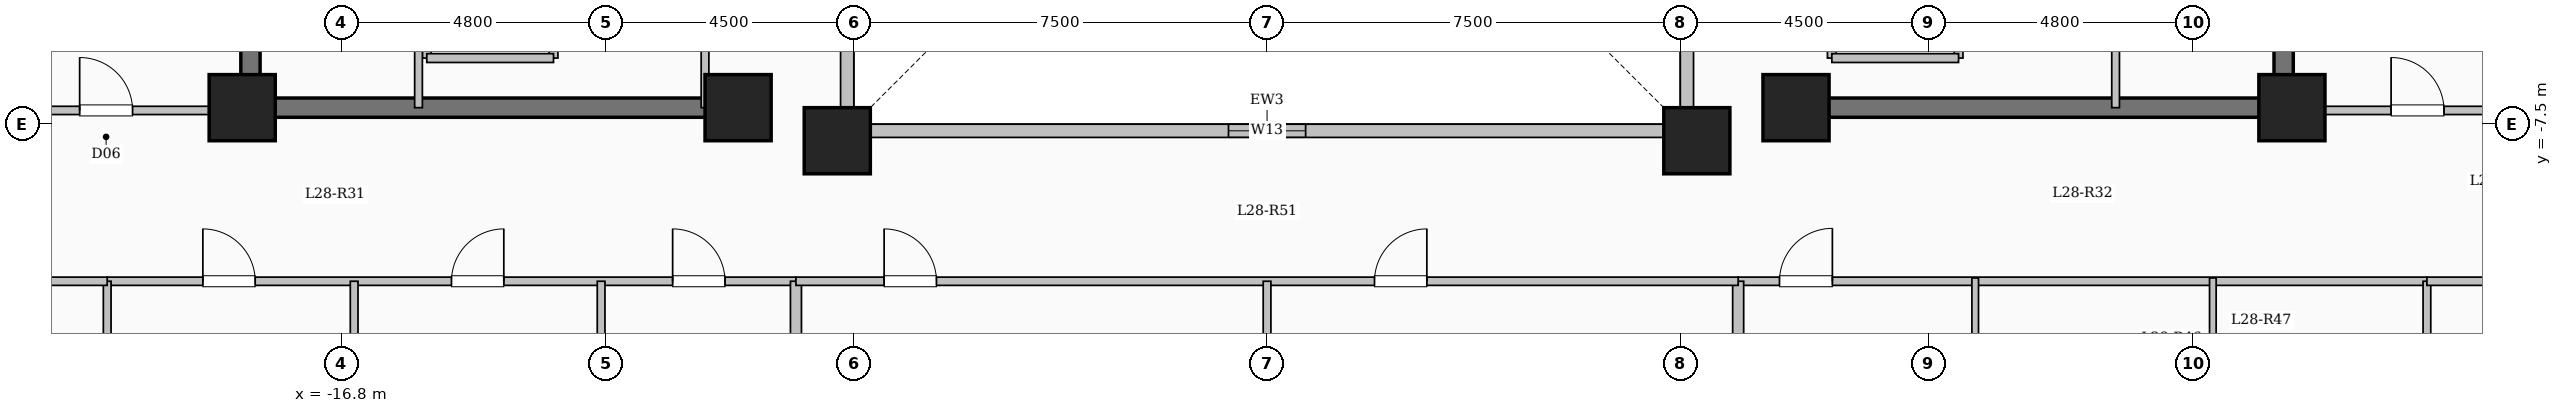
"""IFC4 building model, lengths in metres.
Left out: names, types, materials, properties, quantities, classifications, styles, units other than length and angle.
Written with IfcOpenShell. Run it as: python <this file> out.ifc"""

import sys

from ifc_helpers import new_model, si_unit, direction, frame, frame_2d, origin, origin_2d, place, context, subcontext, project, spatial, rectangle, extrude, element, fill, save


model = new_model("IFC4")
c1 = context("Model", 3, precision=1e-05, world=origin(), true_north=direction((0.0, 1.0)))
c2 = subcontext(c1, "Body", "Model", "MODEL_VIEW")
j1 = project(units=[si_unit("LENGTHUNIT", "METRE"), si_unit("PLANEANGLEUNIT", "RADIAN")], contexts=[c1])
p1 = place(None, origin())
s1 = spatial("IfcSite", under=j1, at=p1, CompositionType="ELEMENT")
p2 = place(p1, origin())
s2 = spatial("IfcBuilding", under=s1, at=p2, CompositionType="ELEMENT")
p3 = place(p2, frame((0.0, 0.0, 105.1)))
s3 = spatial("IfcBuildingStorey", under=s2, at=p3, CompositionType="ELEMENT", Elevation=105.1)
for number, where, z_axis, x_axis in (
    (1, (-7.8, -7.8, 0.0), (0.0, 0.0, 1.0), (1.0, 0.0, 0.0)),
    (2, (7.8, -7.8, 0.0), (0.0, 0.0, 1.0), (1.0, 0.0, 0.0)),
    (3, (-9.6, -7.2, 0.0), (0.0, 0.0, 1.0), (1.0, 0.0, 0.0)),
    (4, (9.6, -7.2, 0.0), (0.0, 0.0, 1.0), (1.0, 0.0, 0.0)),
    (5, (-18.6, -7.2, 0.0), (0.0, 0.0, 1.0), (1.0, 0.0, 0.0)),
    (6, (18.6, -7.2, 0.0), (0.0, 0.0, 1.0), (1.0, 0.0, 0.0)),
):
    element("IfcColumn", number, at=place(p3, frame(where, z_axis=z_axis, x_axis=x_axis)), inside=s3, PredefinedType="COLUMN", context=c2, shape_type="SweptSolid", body=[
        extrude(rectangle(XDim=1.2, YDim=1.2, at=origin_2d()), origin(), (0.0, 0.0, 1.0), 3.35),
    ])
p4 = place(p3, frame((-7.62, -7.62, 0.0), z_axis=(0.0, 0.0, 1.0), x_axis=(1.0, 0.0, 0.0)))
e7 = element("IfcWall", 7, at=p4, inside=s3, PredefinedType="SOLIDWALL", context=c2, shape_type="SweptSolid", body=[
    extrude(rectangle(XDim=15.24, YDim=0.24, at=frame_2d((7.62, 0.0))), origin(), (0.0, 0.0, 1.0), 3.1),
])
p5 = place(p4, frame((6.92, 0.0, 0.95)))
e8 = element("IfcOpeningElement", 8, at=p5, cuts=e7, PredefinedType="OPENING", context=c2, shape_type="SweptSolid", body=[
    extrude(rectangle(XDim=1.4, YDim=1.5, at=frame_2d((0.7, 0.75))), frame((0.0, 0.13, 0.0), z_axis=(0.0, -1.0, 0.0), x_axis=(1.0, 0.0, 0.0)), (0.0, 0.0, 1.0), 0.26),
])
p6 = place(p3, frame((7.62, -7.62, 0.0), z_axis=(0.0, 0.0, 1.0), x_axis=(0.0, 1.0, 0.0)))
e9 = element("IfcWall", 9, at=p6, inside=s3, PredefinedType="SOLIDWALL", context=c2, shape_type="SweptSolid", body=[
    extrude(rectangle(XDim=15.24, YDim=0.24, at=frame_2d((7.62, 0.0))), origin(), (0.0, 0.0, 1.0), 3.1),
])
p7 = place(p6, frame((6.92, 0.0, 0.95)))
e10 = element("IfcOpeningElement", 10, at=p7, cuts=e9, PredefinedType="OPENING", context=c2, shape_type="SweptSolid", body=[
    extrude(rectangle(XDim=1.4, YDim=1.5, at=frame_2d((0.7, 0.75))), frame((0.0, 0.13, 0.0), z_axis=(0.0, -1.0, 0.0), x_axis=(1.0, 0.0, 0.0)), (0.0, 0.0, 1.0), 0.26),
])
p8 = place(p3, frame((-7.62, 7.62, 0.0), z_axis=(0.0, 0.0, 1.0), x_axis=(0.0, -1.0, 0.0)))
e11 = element("IfcWall", 11, at=p8, inside=s3, PredefinedType="SOLIDWALL", context=c2, shape_type="SweptSolid", body=[
    extrude(rectangle(XDim=15.24, YDim=0.24, at=frame_2d((7.62, 0.0))), origin(), (0.0, 0.0, 1.0), 3.1),
])
p9 = place(p8, frame((6.92, 0.0, 0.95)))
e12 = element("IfcOpeningElement", 12, at=p9, cuts=e11, PredefinedType="OPENING", context=c2, shape_type="SweptSolid", body=[
    extrude(rectangle(XDim=1.4, YDim=1.5, at=frame_2d((0.7, 0.75))), frame((0.0, 0.13, 0.0), z_axis=(0.0, -1.0, 0.0), x_axis=(1.0, 0.0, 0.0)), (0.0, 0.0, 1.0), 0.26),
])
for number, where, z_axis, x_axis in (
    (13, (-15.25, -6.3, 0.0), (0.0, 0.0, 1.0), (0.0, 1.0, 0.0)),
    (14, (-12.95, -6.3, 0.0), (0.0, 0.0, 1.0), (0.0, 1.0, 0.0)),
):
    element("IfcWall", number, at=place(p3, frame(where, z_axis=z_axis, x_axis=x_axis)), inside=s3, PredefinedType="SOLIDWALL", context=c2, shape_type="SweptSolid", body=[
        extrude(rectangle(XDim=2.6, YDim=0.16, at=frame_2d((1.3, 0.0))), origin(), (0.0, 0.0, 1.0), 3.1),
    ])
p10 = place(p3, frame((-15.25, -6.3, 0.0), z_axis=(0.0, 0.0, 1.0), x_axis=(1.0, 0.0, 0.0)))
e15 = element("IfcWall", 15, at=p10, inside=s3, PredefinedType="SOLIDWALL", context=c2, shape_type="SweptSolid", body=[
    extrude(rectangle(XDim=2.3, YDim=0.16, at=frame_2d((1.15, 0.0))), origin(), (0.0, 0.0, 1.0), 3.1),
])
p11 = place(p3, frame((10.25, -6.3, 0.0), z_axis=(0.0, 0.0, 1.0), x_axis=(0.0, 1.0, 0.0)))
e16 = element("IfcWall", 16, at=p11, inside=s3, PredefinedType="SOLIDWALL", context=c2, shape_type="SweptSolid", body=[
    extrude(rectangle(XDim=2.6, YDim=0.16, at=frame_2d((1.3, 0.0))), origin(), (0.0, 0.0, 1.0), 3.1),
])
p12 = place(p11, frame((0.75, 0.0, 0.0)))
e17 = element("IfcOpeningElement", 17, at=p12, cuts=e16, PredefinedType="OPENING", context=c2, shape_type="SweptSolid", body=[
    extrude(rectangle(XDim=1.1, YDim=2.15, at=frame_2d((0.55, 1.075))), frame((0.0, 0.09, 0.0), z_axis=(0.0, -1.0, 0.0), x_axis=(1.0, 0.0, 0.0)), (0.0, 0.0, 1.0), 0.18),
])
p13 = place(p3, frame((12.55, -6.3, 0.0), z_axis=(0.0, 0.0, 1.0), x_axis=(0.0, 1.0, 0.0)))
e18 = element("IfcWall", 18, at=p13, inside=s3, PredefinedType="SOLIDWALL", context=c2, shape_type="SweptSolid", body=[
    extrude(rectangle(XDim=2.6, YDim=0.16, at=frame_2d((1.3, 0.0))), origin(), (0.0, 0.0, 1.0), 3.1),
])
p14 = place(p3, frame((10.25, -6.3, 0.0), z_axis=(0.0, 0.0, 1.0), x_axis=(1.0, 0.0, 0.0)))
e19 = element("IfcWall", 19, at=p14, inside=s3, PredefinedType="SOLIDWALL", context=c2, shape_type="SweptSolid", body=[
    extrude(rectangle(XDim=2.3, YDim=0.16, at=frame_2d((1.15, 0.0))), origin(), (0.0, 0.0, 1.0), 3.1),
])
p15 = place(p3, frame((-18.45, -7.375, 0.0), z_axis=(0.0, 0.0, 1.0), x_axis=(0.0, 1.0, 0.0)))
e20 = element("IfcWall", 20, at=p15, inside=s3, PredefinedType="SHEAR", context=c2, shape_type="SweptSolid", body=[
    extrude(rectangle(XDim=14.05, YDim=0.35, at=frame_2d((7.025, 0.0))), origin(), (0.0, 0.0, 1.0), 3.35),
])
p16 = place(p3, frame((-18.625, -7.2, 0.0), z_axis=(0.0, 0.0, 1.0), x_axis=(1.0, 0.0, 0.0)))
e21 = element("IfcWall", 21, at=p16, inside=s3, PredefinedType="SHEAR", context=c2, shape_type="SweptSolid", body=[
    extrude(rectangle(XDim=8.55, YDim=0.35, at=frame_2d((4.275, 0.0))), origin(), (0.0, 0.0, 1.0), 3.35),
])
p17 = place(p3, frame((18.45, -7.375, 0.0), z_axis=(0.0, 0.0, 1.0), x_axis=(0.0, 1.0, 0.0)))
e22 = element("IfcWall", 22, at=p17, inside=s3, PredefinedType="SHEAR", context=c2, shape_type="SweptSolid", body=[
    extrude(rectangle(XDim=14.05, YDim=0.35, at=frame_2d((7.025, 0.0))), origin(), (0.0, 0.0, 1.0), 3.35),
])
p18 = place(p3, frame((10.075, -7.2, 0.0), z_axis=(0.0, 0.0, 1.0), x_axis=(1.0, 0.0, 0.0)))
e23 = element("IfcWall", 23, at=p18, inside=s3, PredefinedType="SHEAR", context=c2, shape_type="SweptSolid", body=[
    extrude(rectangle(XDim=8.55, YDim=0.35, at=frame_2d((4.275, 0.0))), origin(), (0.0, 0.0, 1.0), 3.35),
])
p19 = place(p3, frame((-15.4, -7.2, 0.0), z_axis=(0.0, 0.0, 1.0), x_axis=(0.0, 1.0, 0.0)))
e24 = element("IfcWall", 24, at=p19, inside=s3, PredefinedType="PARTITIONING", context=c2, shape_type="SweptSolid", body=[
    extrude(rectangle(XDim=10.45, YDim=0.14, at=frame_2d((5.225, 0.0))), origin(), (0.0, 0.0, 1.0), 3.1),
])
p20 = place(p19, frame((9.25, 0.0, 0.0)))
e25 = element("IfcOpeningElement", 25, at=p20, cuts=e24, PredefinedType="OPENING", context=c2, shape_type="SweptSolid", body=[
    extrude(rectangle(XDim=0.9, YDim=2.08, at=frame_2d((0.45, 1.04))), frame((0.0, 0.08, 0.0), z_axis=(0.0, -1.0, 0.0), x_axis=(1.0, 0.0, 0.0)), (0.0, 0.0, 1.0), 0.16),
])
p21 = place(p3, frame((-10.2, -7.2, 0.0), z_axis=(0.0, 0.0, 1.0), x_axis=(0.0, 1.0, 0.0)))
e26 = element("IfcWall", 26, at=p21, inside=s3, PredefinedType="PARTITIONING", context=c2, shape_type="SweptSolid", body=[
    extrude(rectangle(XDim=9.12, YDim=0.14, at=frame_2d((4.56, 0.0))), origin(), (0.0, 0.0, 1.0), 3.1),
])
p22 = place(p21, frame((1.9, 0.0, 0.0)))
e27 = element("IfcOpeningElement", 27, at=p22, cuts=e26, PredefinedType="OPENING", context=c2, shape_type="SweptSolid", body=[
    extrude(rectangle(XDim=0.95, YDim=2.12, at=frame_2d((0.475, 1.06))), frame((0.0, 0.08, 0.0), z_axis=(0.0, -1.0, 0.0), x_axis=(1.0, 0.0, 0.0)), (0.0, 0.0, 1.0), 0.16),
])
p23 = place(p21, frame((5.8, 0.0, 0.0)))
e28 = element("IfcOpeningElement", 28, at=p23, cuts=e26, PredefinedType="OPENING", context=c2, shape_type="SweptSolid", body=[
    extrude(rectangle(XDim=0.95, YDim=2.12, at=frame_2d((0.475, 1.06))), frame((0.0, 0.08, 0.0), z_axis=(0.0, -1.0, 0.0), x_axis=(1.0, 0.0, 0.0)), (0.0, 0.0, 1.0), 0.16),
])
p24 = place(p3, frame((15.4, -7.2, 0.0), z_axis=(0.0, 0.0, 1.0), x_axis=(0.0, 1.0, 0.0)))
e29 = element("IfcWall", 29, at=p24, inside=s3, PredefinedType="PARTITIONING", context=c2, shape_type="SweptSolid", body=[
    extrude(rectangle(XDim=10.45, YDim=0.14, at=frame_2d((5.225, 0.0))), origin(), (0.0, 0.0, 1.0), 3.1),
])
p25 = place(p24, frame((9.25, 0.0, 0.0)))
e30 = element("IfcOpeningElement", 30, at=p25, cuts=e29, PredefinedType="OPENING", context=c2, shape_type="SweptSolid", body=[
    extrude(rectangle(XDim=0.9, YDim=2.08, at=frame_2d((0.45, 1.04))), frame((0.0, 0.08, 0.0), z_axis=(0.0, -1.0, 0.0), x_axis=(1.0, 0.0, 0.0)), (0.0, 0.0, 1.0), 0.16),
])
p26 = place(p3, frame((-21.05, -10.35, 0.0), z_axis=(0.0, 0.0, 1.0), x_axis=(1.0, 0.0, 0.0)))
e31 = element("IfcWall", 31, at=p26, inside=s3, PredefinedType="PARTITIONING", context=c2, shape_type="SweptSolid", body=[
    extrude(rectangle(XDim=12.5, YDim=0.15, at=frame_2d((6.25, 0.0))), origin(), (0.0, 0.0, 1.0), 3.1),
])
p27 = place(p26, frame((1.736, 0.0, 0.0)))
e32 = element("IfcOpeningElement", 32, at=p27, cuts=e31, PredefinedType="OPENING", context=c2, shape_type="SweptSolid", body=[
    extrude(rectangle(XDim=0.95, YDim=2.15, at=frame_2d((0.475, 1.075))), frame((0.0, 0.085, 0.0), z_axis=(0.0, -1.0, 0.0), x_axis=(1.0, 0.0, 0.0)), (0.0, 0.0, 1.0), 0.17),
])
p28 = place(p26, frame((6.248, 0.0, 0.0)))
e33 = element("IfcOpeningElement", 33, at=p28, cuts=e31, PredefinedType="OPENING", context=c2, shape_type="SweptSolid", body=[
    extrude(rectangle(XDim=0.95, YDim=2.15, at=frame_2d((0.475, 1.075))), frame((0.0, 0.085, 0.0), z_axis=(0.0, -1.0, 0.0), x_axis=(1.0, 0.0, 0.0)), (0.0, 0.0, 1.0), 0.17),
])
p29 = place(p26, frame((10.262, 0.0, 0.0)))
e34 = element("IfcOpeningElement", 34, at=p29, cuts=e31, PredefinedType="OPENING", context=c2, shape_type="SweptSolid", body=[
    extrude(rectangle(XDim=0.95, YDim=2.15, at=frame_2d((0.475, 1.075))), frame((0.0, 0.085, 0.0), z_axis=(0.0, -1.0, 0.0), x_axis=(1.0, 0.0, 0.0)), (0.0, 0.0, 1.0), 0.17),
])
p30 = place(p3, frame((8.55, -10.35, 0.0), z_axis=(0.0, 0.0, 1.0), x_axis=(1.0, 0.0, 0.0)))
e35 = element("IfcWall", 35, at=p30, inside=s3, PredefinedType="PARTITIONING", context=c2, shape_type="SweptSolid", body=[
    extrude(rectangle(XDim=12.5, YDim=0.15, at=frame_2d((6.25, 0.0))), origin(), (0.0, 0.0, 1.0), 3.1),
])
p31 = place(p30, frame((0.75, 0.0, 0.0)))
e36 = element("IfcOpeningElement", 36, at=p31, cuts=e35, PredefinedType="OPENING", context=c2, shape_type="SweptSolid", body=[
    extrude(rectangle(XDim=0.96, YDim=2.15, at=frame_2d((0.48, 1.075))), frame((0.0, 0.085, 0.0), z_axis=(0.0, -1.0, 0.0), x_axis=(1.0, 0.0, 0.0)), (0.0, 0.0, 1.0), 0.17),
])
for number, where, z_axis, x_axis in (
    (37, (-16.568, -22.05, 0.0), (0.0, 0.0, 1.0), (0.0, 1.0, 0.0)),
    (38, (-12.086, -22.05, 0.0), (0.0, 0.0, 1.0), (0.0, 1.0, 0.0)),
):
    element("IfcWall", number, at=place(p3, frame(where, z_axis=z_axis, x_axis=x_axis)), inside=s3, PredefinedType="PARTITIONING", context=c2, shape_type="SweptSolid", body=[
        extrude(rectangle(XDim=11.7, YDim=0.14, at=frame_2d((5.85, 0.0))), origin(), (0.0, 0.0, 1.0), 3.1),
    ])
p32 = place(p3, frame((12.852, -22.1, 0.0), z_axis=(0.0, 0.0, 1.0), x_axis=(0.0, 1.0, 0.0)))
e39 = element("IfcWall", 39, at=p32, inside=s3, PredefinedType="PARTITIONING", context=c2, shape_type="SweptSolid", body=[
    extrude(rectangle(XDim=11.81, YDim=0.12, at=frame_2d((5.905, 0.0))), origin(), (0.0, 0.0, 1.0), 3.1),
])
p33 = place(p32, frame((7.815, 0.0, 0.0)))
e40 = element("IfcOpeningElement", 40, at=p33, cuts=e39, PredefinedType="OPENING", context=c2, shape_type="SweptSolid", body=[
    extrude(rectangle(XDim=1.08, YDim=2.15, at=frame_2d((0.54, 1.075))), frame((0.0, 0.07, 0.0), z_axis=(0.0, -1.0, 0.0), x_axis=(1.0, 0.0, 0.0)), (0.0, 0.0, 1.0), 0.14),
])
p34 = place(p3, frame((17.165, -12.92, 0.0), z_axis=(0.0, 0.0, 1.0), x_axis=(0.0, 1.0, 0.0)))
e41 = element("IfcWall", 41, at=p34, inside=s3, PredefinedType="PARTITIONING", context=c2, shape_type="SweptSolid", body=[
    extrude(rectangle(XDim=2.63, YDim=0.12, at=frame_2d((1.315, 0.0))), origin(), (0.0, 0.0, 1.0), 3.1),
])
for number, where, z_axis, x_axis in (
    (42, (-8.55, -22.704, 0.0), (0.0, 0.0, 1.0), (0.0, 1.0, 0.0)),
    (43, (8.55, -22.704, 0.0), (0.0, 0.0, 1.0), (0.0, 1.0, 0.0)),
):
    element("IfcWall", number, at=place(p3, frame(where, z_axis=z_axis, x_axis=x_axis)), inside=s3, PredefinedType="SOLIDWALL", context=c2, shape_type="SweptSolid", body=[
        extrude(rectangle(XDim=12.354, YDim=0.2, at=frame_2d((6.177, 0.0))), origin(), (0.0, 0.0, 1.0), 3.1),
    ])
p35 = place(p3, frame((-8.55, -10.35, 0.0), z_axis=(0.0, 0.0, 1.0), x_axis=(1.0, 0.0, 0.0)))
e44 = element("IfcWall", 44, at=p35, inside=s3, PredefinedType="PARTITIONING", context=c2, shape_type="SweptSolid", body=[
    extrude(rectangle(XDim=17.1, YDim=0.15, at=frame_2d((8.55, 0.0))), origin(), (0.0, 0.0, 1.0), 3.1),
])
p36 = place(p35, frame((1.6, 0.0, 0.0)))
e45 = element("IfcOpeningElement", 45, at=p36, cuts=e44, PredefinedType="OPENING", context=c2, shape_type="SweptSolid", body=[
    extrude(rectangle(XDim=0.95, YDim=2.15, at=frame_2d((0.475, 1.075))), frame((0.0, 0.085, 0.0), z_axis=(0.0, -1.0, 0.0), x_axis=(1.0, 0.0, 0.0)), (0.0, 0.0, 1.0), 0.17),
])
p37 = place(p35, frame((10.5, 0.0, 0.0)))
e46 = element("IfcOpeningElement", 46, at=p37, cuts=e44, PredefinedType="OPENING", context=c2, shape_type="SweptSolid", body=[
    extrude(rectangle(XDim=0.95, YDim=2.15, at=frame_2d((0.475, 1.075))), frame((0.0, 0.085, 0.0), z_axis=(0.0, -1.0, 0.0), x_axis=(1.0, 0.0, 0.0)), (0.0, 0.0, 1.0), 0.17),
])
p38 = place(p3, frame((0.0, -23.58, 0.0), z_axis=(0.0, 0.0, 1.0), x_axis=(0.0, 1.0, 0.0)))
e47 = element("IfcWall", 47, at=p38, inside=s3, PredefinedType="PARTITIONING", context=c2, shape_type="SweptSolid", body=[
    extrude(rectangle(XDim=13.23, YDim=0.14, at=frame_2d((6.615, 0.0))), origin(), (0.0, 0.0, 1.0), 3.1),
])
p39 = place(p3, frame((-26.88, -7.25, 0.0), z_axis=(0.0, 0.0, 1.0), x_axis=(1.0, 0.0, 0.0)))
e48 = element("IfcWall", 48, at=p39, inside=s3, PredefinedType="PARTITIONING", context=c2, shape_type="SweptSolid", body=[
    extrude(rectangle(XDim=8.43, YDim=0.15, at=frame_2d((4.215, 0.0))), origin(), (0.0, 0.0, 1.0), 3.1),
])
p40 = place(p39, frame((5.33, 0.0, 0.0)))
e49 = element("IfcOpeningElement", 49, at=p40, cuts=e48, PredefinedType="OPENING", context=c2, shape_type="SweptSolid", body=[
    extrude(rectangle(XDim=0.96, YDim=2.15, at=frame_2d((0.48, 1.075))), frame((0.0, 0.085, 0.0), z_axis=(0.0, -1.0, 0.0), x_axis=(1.0, 0.0, 0.0)), (0.0, 0.0, 1.0), 0.17),
])
p41 = place(p3, frame((18.45, -7.25, 0.0), z_axis=(0.0, 0.0, 1.0), x_axis=(1.0, 0.0, 0.0)))
e50 = element("IfcWall", 50, at=p41, inside=s3, PredefinedType="PARTITIONING", context=c2, shape_type="SweptSolid", body=[
    extrude(rectangle(XDim=8.43, YDim=0.15, at=frame_2d((4.215, 0.0))), origin(), (0.0, 0.0, 1.0), 3.1),
])
p42 = place(p41, frame((1.95, 0.0, 0.0)))
e51 = element("IfcOpeningElement", 51, at=p42, cuts=e50, PredefinedType="OPENING", context=c2, shape_type="SweptSolid", body=[
    extrude(rectangle(XDim=0.96, YDim=2.15, at=frame_2d((0.48, 1.075))), frame((0.0, 0.085, 0.0), z_axis=(0.0, -1.0, 0.0), x_axis=(1.0, 0.0, 0.0)), (0.0, 0.0, 1.0), 0.17),
])
for number, where, z_axis, x_axis in (
    (52, (-21.05, -17.85, 0.0), (0.0, 0.0, 1.0), (0.0, 1.0, 0.0)),
    (53, (21.05, -17.85, 0.0), (0.0, 0.0, 1.0), (0.0, 1.0, 0.0)),
):
    element("IfcWall", number, at=place(p3, frame(where, z_axis=z_axis, x_axis=x_axis)), inside=s3, PredefinedType="PARTITIONING", context=c2, shape_type="SweptSolid", body=[
        extrude(rectangle(XDim=7.5, YDim=0.14, at=frame_2d((3.75, 0.0))), origin(), (0.0, 0.0, 1.0), 3.1),
    ])
p43 = place(p3, frame((-26.88, -10.35, 0.0), z_axis=(0.0, 0.0, 1.0), x_axis=(1.0, 0.0, 0.0)))
e54 = element("IfcWall", 54, at=p43, inside=s3, PredefinedType="PARTITIONING", context=c2, shape_type="SweptSolid", body=[
    extrude(rectangle(XDim=5.83, YDim=0.15, at=frame_2d((2.915, 0.0))), origin(), (0.0, 0.0, 1.0), 3.1),
])
p44 = place(p43, frame((2.44, 0.0, 0.0)))
e55 = element("IfcOpeningElement", 55, at=p44, cuts=e54, PredefinedType="OPENING", context=c2, shape_type="SweptSolid", body=[
    extrude(rectangle(XDim=0.95, YDim=2.15, at=frame_2d((0.475, 1.075))), frame((0.0, 0.085, 0.0), z_axis=(0.0, -1.0, 0.0), x_axis=(1.0, 0.0, 0.0)), (0.0, 0.0, 1.0), 0.17),
])
p45 = place(p3, frame((21.05, -10.35, 0.0), z_axis=(0.0, 0.0, 1.0), x_axis=(1.0, 0.0, 0.0)))
e56 = element("IfcWall", 56, at=p45, inside=s3, PredefinedType="PARTITIONING", context=c2, shape_type="SweptSolid", body=[
    extrude(rectangle(XDim=5.83, YDim=0.15, at=frame_2d((2.915, 0.0))), origin(), (0.0, 0.0, 1.0), 3.1),
])
p46 = place(p45, frame((2.44, 0.0, 0.0)))
e57 = element("IfcOpeningElement", 57, at=p46, cuts=e56, PredefinedType="OPENING", context=c2, shape_type="SweptSolid", body=[
    extrude(rectangle(XDim=0.95, YDim=2.15, at=frame_2d((0.475, 1.075))), frame((0.0, 0.085, 0.0), z_axis=(0.0, -1.0, 0.0), x_axis=(1.0, 0.0, 0.0)), (0.0, 0.0, 1.0), 0.17),
])
p47 = place(p5, origin())
e58 = element("IfcWindow", 58, at=p47, inside=s3, PartitioningType="SINGLE_PANEL", PredefinedType="WINDOW", context=c2, shape_type="SweptSolid", body=[
    extrude(rectangle(XDim=1.4, YDim=1.5, at=frame_2d((0.7, 0.75))), frame((0.0, 0.03, 0.0), z_axis=(0.0, -1.0, 0.0), x_axis=(1.0, 0.0, 0.0)), (0.0, 0.0, 1.0), 0.06),
])
fill(e8, e58)
p48 = place(p27, origin())
e59 = element("IfcDoor", 59, at=p48, inside=s3, OperationType="SINGLE_SWING_LEFT", PredefinedType="DOOR", context=c2, shape_type="SweptSolid", body=[
    extrude(rectangle(XDim=0.95, YDim=2.15, at=frame_2d((0.475, 1.075))), frame((0.0, 0.025, 0.0), z_axis=(0.0, -1.0, 0.0), x_axis=(1.0, 0.0, 0.0)), (0.0, 0.0, 1.0), 0.05),
])
fill(e32, e59)
p49 = place(p28, origin())
e60 = element("IfcDoor", 60, at=p49, inside=s3, OperationType="SINGLE_SWING_RIGHT", PredefinedType="DOOR", context=c2, shape_type="SweptSolid", body=[
    extrude(rectangle(XDim=0.95, YDim=2.15, at=frame_2d((0.475, 1.075))), frame((0.0, 0.025, 0.0), z_axis=(0.0, -1.0, 0.0), x_axis=(1.0, 0.0, 0.0)), (0.0, 0.0, 1.0), 0.05),
])
fill(e33, e60)
p50 = place(p29, origin())
e61 = element("IfcDoor", 61, at=p50, inside=s3, OperationType="SINGLE_SWING_LEFT", PredefinedType="DOOR", context=c2, shape_type="SweptSolid", body=[
    extrude(rectangle(XDim=0.95, YDim=2.15, at=frame_2d((0.475, 1.075))), frame((0.0, 0.025, 0.0), z_axis=(0.0, -1.0, 0.0), x_axis=(1.0, 0.0, 0.0)), (0.0, 0.0, 1.0), 0.05),
])
fill(e34, e61)
p51 = place(p31, origin())
e62 = element("IfcDoor", 62, at=p51, inside=s3, OperationType="SINGLE_SWING_RIGHT", PredefinedType="DOOR", context=c2, shape_type="SweptSolid", body=[
    extrude(rectangle(XDim=0.96, YDim=2.15, at=frame_2d((0.48, 1.075))), frame((0.0, 0.025, 0.0), z_axis=(0.0, -1.0, 0.0), x_axis=(1.0, 0.0, 0.0)), (0.0, 0.0, 1.0), 0.05),
])
fill(e36, e62)
p52 = place(p36, origin())
e63 = element("IfcDoor", 63, at=p52, inside=s3, OperationType="SINGLE_SWING_LEFT", PredefinedType="DOOR", context=c2, shape_type="SweptSolid", body=[
    extrude(rectangle(XDim=0.95, YDim=2.15, at=frame_2d((0.475, 1.075))), frame((0.0, 0.025, 0.0), z_axis=(0.0, -1.0, 0.0), x_axis=(1.0, 0.0, 0.0)), (0.0, 0.0, 1.0), 0.05),
])
fill(e45, e63)
p53 = place(p37, origin())
e64 = element("IfcDoor", 64, at=p53, inside=s3, OperationType="SINGLE_SWING_RIGHT", PredefinedType="DOOR", context=c2, shape_type="SweptSolid", body=[
    extrude(rectangle(XDim=0.95, YDim=2.15, at=frame_2d((0.475, 1.075))), frame((0.0, 0.025, 0.0), z_axis=(0.0, -1.0, 0.0), x_axis=(1.0, 0.0, 0.0)), (0.0, 0.0, 1.0), 0.05),
])
fill(e46, e64)
p54 = place(p40, origin())
e65 = element("IfcDoor", 65, at=p54, inside=s3, OperationType="SINGLE_SWING_LEFT", PredefinedType="DOOR", context=c2, shape_type="SweptSolid", body=[
    extrude(rectangle(XDim=0.96, YDim=2.15, at=frame_2d((0.48, 1.075))), frame((0.0, 0.025, 0.0), z_axis=(0.0, -1.0, 0.0), x_axis=(1.0, 0.0, 0.0)), (0.0, 0.0, 1.0), 0.05),
])
fill(e49, e65)
p55 = place(p42, origin())
e66 = element("IfcDoor", 66, at=p55, inside=s3, OperationType="SINGLE_SWING_LEFT", PredefinedType="DOOR", context=c2, shape_type="SweptSolid", body=[
    extrude(rectangle(XDim=0.96, YDim=2.15, at=frame_2d((0.48, 1.075))), frame((0.0, 0.025, 0.0), z_axis=(0.0, -1.0, 0.0), x_axis=(1.0, 0.0, 0.0)), (0.0, 0.0, 1.0), 0.05),
])
fill(e51, e66)
save(model, sys.argv[1])
